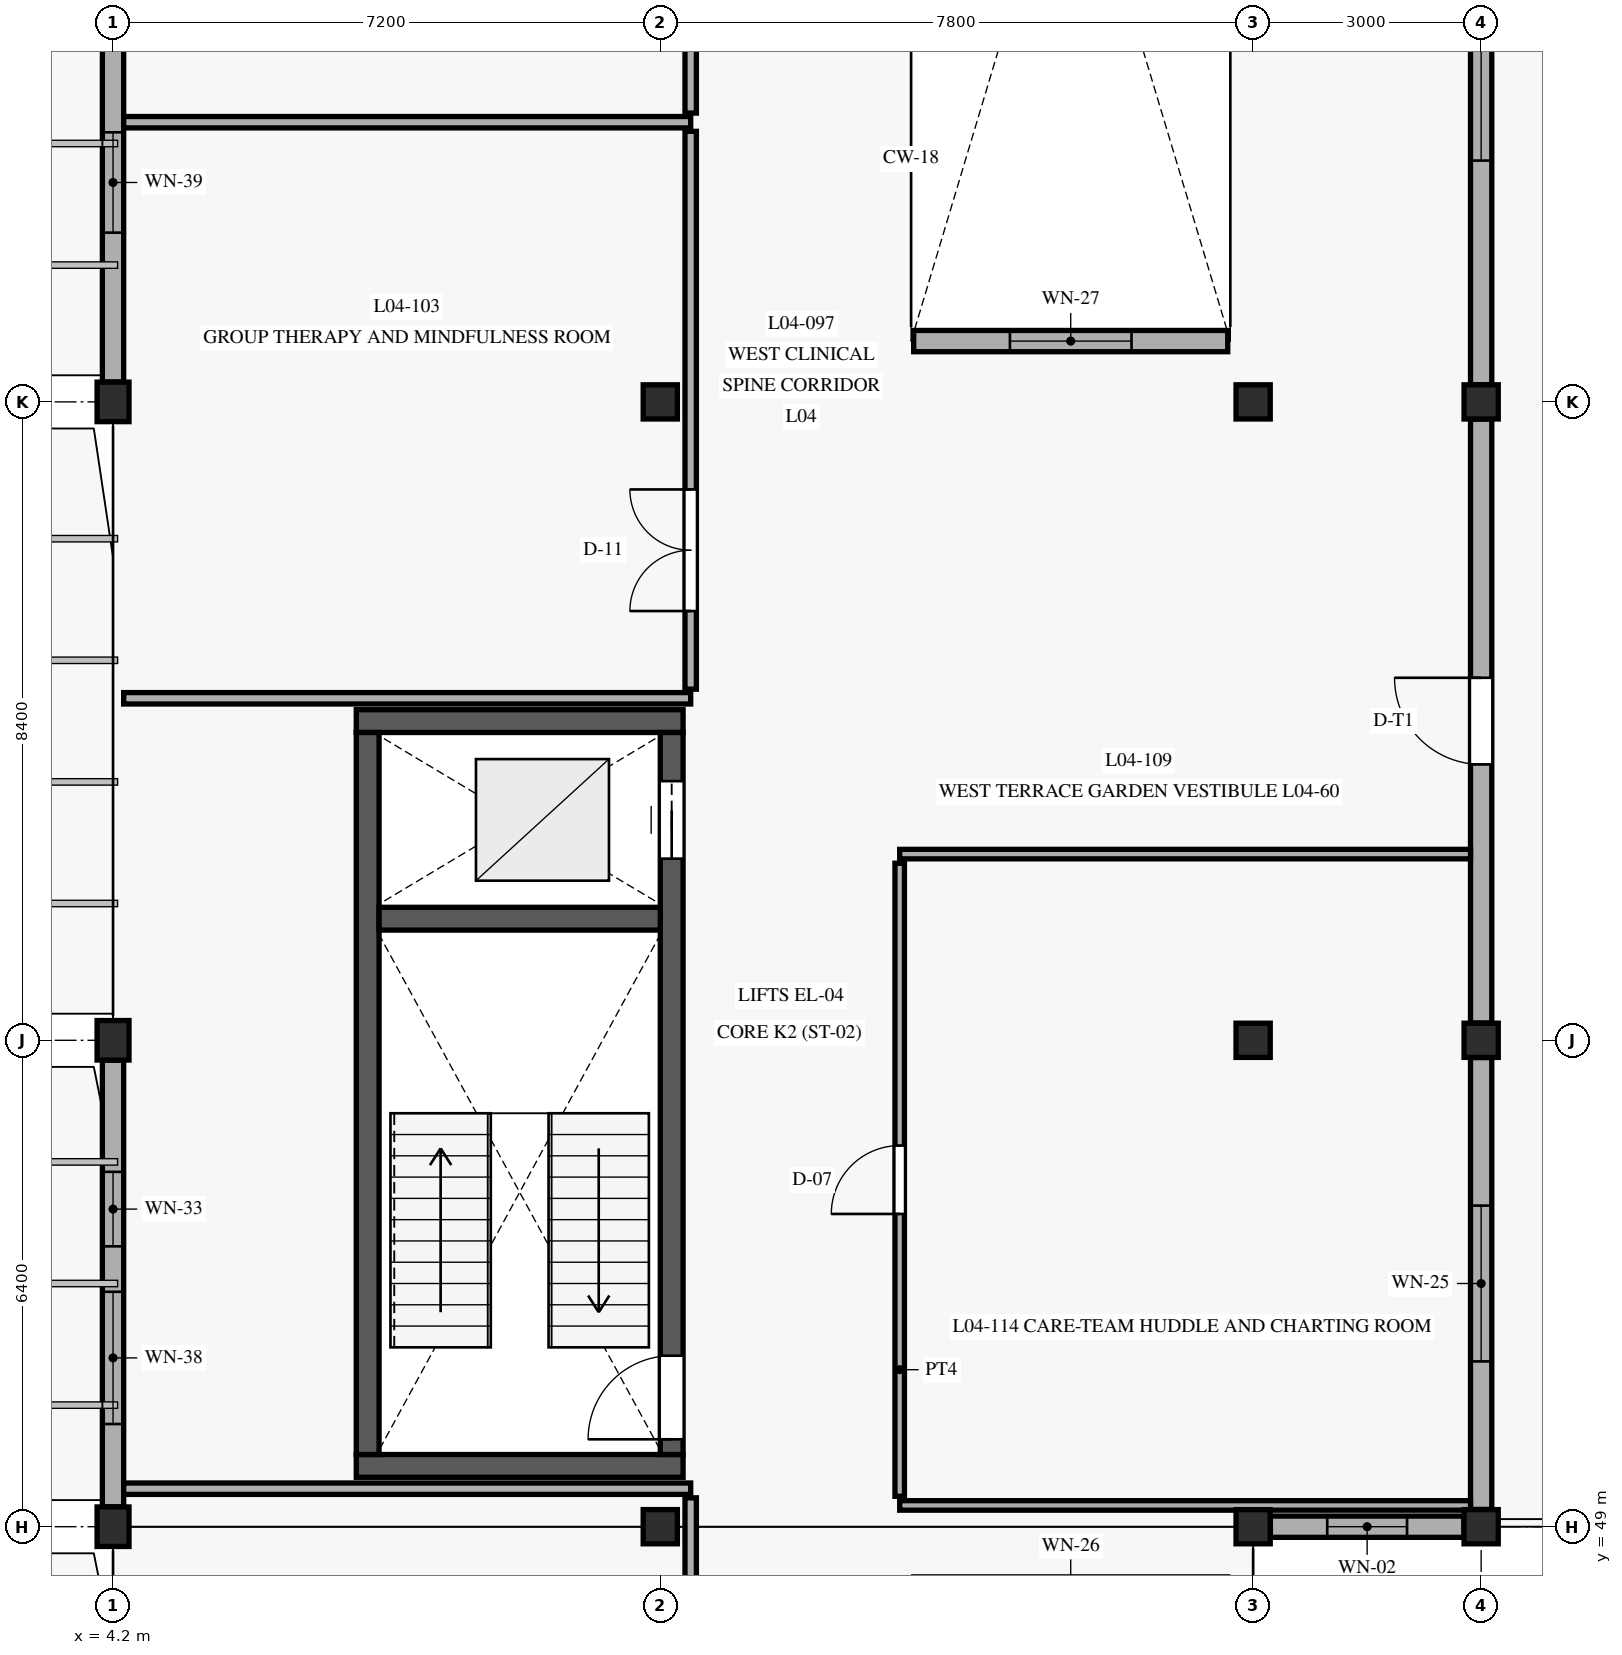
"""IFC4 building model, lengths in metres.
Left out: names, types, materials, properties, quantities, classifications, styles, units other than length and angle.
Written with IfcOpenShell. Run it as: python <this file> out.ifc"""

import sys

from ifc_helpers import new_model, si_unit, direction, frame, frame_2d, origin, origin_with_axes, origin_2d, place, context, subcontext, project, spatial, rectangle, extrude, element, fill, save


model = new_model("IFC4")
c1 = context("Model", 3, precision=1e-05, world=origin(), true_north=direction((0.0, 1.0)))
c2 = subcontext(c1, "Body", "Model", "MODEL_VIEW")
j1 = project(units=[si_unit("LENGTHUNIT", "METRE"), si_unit("PLANEANGLEUNIT", "RADIAN")], contexts=[c1])
p1 = place(None, origin())
s1 = spatial("IfcSite", under=j1, at=p1, CompositionType="ELEMENT")
p2 = place(p1, origin())
s2 = spatial("IfcBuilding", under=s1, at=p2, CompositionType="ELEMENT")
p3 = place(p2, frame((0.0, 0.0, 13.5)))
s3 = spatial("IfcBuildingStorey", under=s2, at=p3, CompositionType="ELEMENT", Elevation=13.5)
for number, where, z_axis, x_axis in (
    (1, (4.2, 49.0, 0.0), (0.0, 0.0, 1.0), (1.0, 0.0, 0.0)),
    (2, (4.2, 55.4, 0.0), (0.0, 0.0, 1.0), (1.0, 0.0, 0.0)),
    (3, (4.2, 63.8, 0.0), (0.0, 0.0, 1.0), (1.0, 0.0, 0.0)),
):
    element("IfcColumn", number, at=place(p3, frame(where, z_axis=z_axis, x_axis=x_axis)), inside=s3, PredefinedType="COLUMN", context=c2, shape_type="SweptSolid", body=[
        extrude(rectangle(XDim=0.42, YDim=0.52, at=origin_2d()), origin(), (0.0, 0.0, 1.0), 4.05),
    ])
for number, where, z_axis, x_axis in (
    (4, (11.4, 49.0, 0.0), (0.0, 0.0, 1.0), (1.0, 0.0, 0.0)),
    (5, (11.4, 63.8, 0.0), (0.0, 0.0, 1.0), (1.0, 0.0, 0.0)),
    (6, (19.2, 49.0, 0.0), (0.0, 0.0, 1.0), (1.0, 0.0, 0.0)),
    (7, (19.2, 55.4, 0.0), (0.0, 0.0, 1.0), (1.0, 0.0, 0.0)),
    (8, (19.2, 63.8, 0.0), (0.0, 0.0, 1.0), (1.0, 0.0, 0.0)),
    (9, (22.2, 49.0, 0.0), (0.0, 0.0, 1.0), (1.0, 0.0, 0.0)),
    (10, (22.2, 55.4, 0.0), (0.0, 0.0, 1.0), (1.0, 0.0, 0.0)),
    (11, (22.2, 63.8, 0.0), (0.0, 0.0, 1.0), (1.0, 0.0, 0.0)),
):
    element("IfcColumn", number, at=place(p3, frame(where, z_axis=z_axis, x_axis=x_axis)), inside=s3, PredefinedType="COLUMN", context=c2, shape_type="SweptSolid", body=[
        extrude(rectangle(XDim=0.45, YDim=0.45, at=origin_2d()), origin(), (0.0, 0.0, 1.0), 4.05),
    ])
for number, where, z_axis, x_axis in (
    (12, (7.4, 49.8, 0.0), (0.0, 0.0, 1.0), (1.0, 0.0, 0.0)),
    (13, (11.7, 59.6, 0.0), (0.0, 0.0, 1.0), (-1.0, 0.0, 0.0)),
):
    element("IfcWall", number, at=place(p3, frame(where, z_axis=z_axis, x_axis=x_axis)), inside=s3, PredefinedType="SHEAR", context=c2, shape_type="SweptSolid", body=[
        extrude(rectangle(XDim=4.3, YDim=0.3, at=frame_2d((2.15, 0.0))), origin(), (0.0, 0.0, 1.0), 3.75),
    ])
p4 = place(p3, frame((7.55, 59.45, 0.0), z_axis=(0.0, 0.0, 1.0), x_axis=(0.0, -1.0, 0.0)))
e14 = element("IfcWall", 14, at=p4, inside=s3, PredefinedType="SHEAR", context=c2, shape_type="SweptSolid", body=[
    extrude(rectangle(XDim=9.5, YDim=0.3, at=frame_2d((4.75, 0.0))), origin(), (0.0, 0.0, 1.0), 3.75),
])
p5 = place(p3, frame((11.55, 49.95, 0.0), z_axis=(0.0, 0.0, 1.0), x_axis=(0.0, 1.0, 0.0)))
e15 = element("IfcWall", 15, at=p5, inside=s3, PredefinedType="SHEAR", context=c2, shape_type="SweptSolid", body=[
    extrude(rectangle(XDim=9.5, YDim=0.3, at=frame_2d((4.75, 0.0))), origin(), (0.0, 0.0, 1.0), 3.75),
])
p6 = place(p5, frame((0.2, 0.0, 0.0)))
e16 = element("IfcOpeningElement", 16, at=p6, cuts=e15, PredefinedType="OPENING", context=c2, shape_type="SweptSolid", body=[
    extrude(rectangle(XDim=1.1, YDim=2.2, at=frame_2d((0.55, 1.1))), frame((0.0, 0.16, 0.0), z_axis=(0.0, -1.0, 0.0), x_axis=(1.0, 0.0, 0.0)), (0.0, 0.0, 1.0), 0.32),
])
p7 = place(p5, frame((7.84, 0.0, 0.0)))
e17 = element("IfcOpeningElement", 17, at=p7, cuts=e15, PredefinedType="OPENING", context=c2, shape_type="SweptSolid", body=[
    extrude(rectangle(XDim=1.02, YDim=2.15, at=frame_2d((0.51, 1.075))), frame((0.0, 0.16, 0.0), z_axis=(0.0, -1.0, 0.0), x_axis=(1.0, 0.0, 0.0)), (0.0, 0.0, 1.0), 0.32),
])
p8 = place(p3, frame((7.7, 57.0, 0.0), z_axis=(0.0, 0.0, 1.0), x_axis=(1.0, 0.0, 0.0)))
e18 = element("IfcWall", 18, at=p8, inside=s3, PredefinedType="SHEAR", context=c2, shape_type="SweptSolid", body=[
    extrude(rectangle(XDim=3.7, YDim=0.3, at=frame_2d((1.85, 0.0))), origin(), (0.0, 0.0, 1.0), 3.75),
])
p9 = place(p3, frame((4.2, 55.138, 0.0), z_axis=(0.0, 0.0, 1.0), x_axis=(0.0, -1.0, 0.0)))
e19 = element("IfcWall", 19, at=p9, inside=s3, PredefinedType="SOLIDWALL", context=c2, shape_type="SweptSolid", body=[
    extrude(rectangle(XDim=5.876, YDim=0.28, at=frame_2d((2.938, 0.0))), origin(), (0.0, 0.0, 1.0), 3.33),
])
p10 = place(p9, frame((1.469, 0.0, 0.88)))
e20 = element("IfcOpeningElement", 20, at=p10, cuts=e19, PredefinedType="OPENING", context=c2, shape_type="SweptSolid", body=[
    extrude(rectangle(XDim=0.98, YDim=2.1, at=frame_2d((0.49, 1.05))), frame((0.0, 0.15, 0.0), z_axis=(0.0, -1.0, 0.0), x_axis=(1.0, 0.0, 0.0)), (0.0, 0.0, 1.0), 0.3),
])
p11 = place(p9, frame((3.047, 0.0, 0.88)))
e21 = element("IfcOpeningElement", 21, at=p11, cuts=e19, PredefinedType="OPENING", context=c2, shape_type="SweptSolid", body=[
    extrude(rectangle(XDim=1.74, YDim=1.9, at=frame_2d((0.87, 0.95))), frame((0.0, 0.15, 0.0), z_axis=(0.0, -1.0, 0.0), x_axis=(1.0, 0.0, 0.0)), (0.0, 0.0, 1.0), 0.3),
])
p12 = place(p3, frame((4.2, 71.938, 0.0), z_axis=(0.0, 0.0, 1.0), x_axis=(0.0, -1.0, 0.0)))
e22 = element("IfcWall", 22, at=p12, inside=s3, PredefinedType="SOLIDWALL", context=c2, shape_type="SweptSolid", body=[
    extrude(rectangle(XDim=7.876, YDim=0.28, at=frame_2d((3.938, 0.0))), origin(), (0.0, 0.0, 1.0), 3.33),
])
p13 = place(p12, frame((2.065, 0.0, 0.88)))
e23 = element("IfcOpeningElement", 23, at=p13, cuts=e22, PredefinedType="OPENING", context=c2, shape_type="SweptSolid", body=[
    extrude(rectangle(XDim=1.12, YDim=1.95, at=frame_2d((0.56, 0.975))), frame((0.0, 0.15, 0.0), z_axis=(0.0, -1.0, 0.0), x_axis=(1.0, 0.0, 0.0)), (0.0, 0.0, 1.0), 0.3),
])
p14 = place(p12, frame((4.591, 0.0, 0.88)))
e24 = element("IfcOpeningElement", 24, at=p14, cuts=e22, PredefinedType="OPENING", context=c2, shape_type="SweptSolid", body=[
    extrude(rectangle(XDim=1.32, YDim=2.15, at=frame_2d((0.66, 1.075))), frame((0.0, 0.15, 0.0), z_axis=(0.0, -1.0, 0.0), x_axis=(1.0, 0.0, 0.0)), (0.0, 0.0, 1.0), 0.3),
])
p15 = place(p3, frame((22.2, 49.227, 0.0), z_axis=(0.0, 0.0, 1.0), x_axis=(0.0, 1.0, 0.0)))
e25 = element("IfcWall", 25, at=p15, inside=s3, PredefinedType="SOLIDWALL", context=c2, shape_type="SweptSolid", body=[
    extrude(rectangle(XDim=5.946, YDim=0.28, at=frame_2d((2.973, 0.0))), origin(), (0.0, 0.0, 1.0), 3.34),
])
p16 = place(p15, frame((1.948, 0.0, 0.8)))
e26 = element("IfcOpeningElement", 26, at=p16, cuts=e25, PredefinedType="OPENING", context=c2, shape_type="SweptSolid", body=[
    extrude(rectangle(XDim=2.05, YDim=1.95, at=frame_2d((1.025, 0.975))), frame((0.0, 0.15, 0.0), z_axis=(0.0, -1.0, 0.0), x_axis=(1.0, 0.0, 0.0)), (0.0, 0.0, 1.0), 0.3),
])
p17 = place(p3, frame((22.2, 55.627, 0.0), z_axis=(0.0, 0.0, 1.0), x_axis=(0.0, 1.0, 0.0)))
e27 = element("IfcWall", 27, at=p17, inside=s3, PredefinedType="SOLIDWALL", context=c2, shape_type="SweptSolid", body=[
    extrude(rectangle(XDim=7.946, YDim=0.28, at=frame_2d((3.973, 0.0))), origin(), (0.0, 0.0, 1.0), 3.34),
])
p18 = place(p17, frame((3.403, 0.0, 0.0)))
e28 = element("IfcOpeningElement", 28, at=p18, cuts=e27, PredefinedType="OPENING", context=c2, shape_type="SweptSolid", body=[
    extrude(rectangle(XDim=1.14, YDim=2.3, at=frame_2d((0.57, 1.15))), frame((0.0, 0.15, 0.0), z_axis=(0.0, -1.0, 0.0), x_axis=(1.0, 0.0, 0.0)), (0.0, 0.0, 1.0), 0.3),
])
p19 = place(p3, frame((22.2, 64.027, 0.0), z_axis=(0.0, 0.0, 1.0), x_axis=(0.0, 1.0, 0.0)))
e29 = element("IfcWall", 29, at=p19, inside=s3, PredefinedType="SOLIDWALL", context=c2, shape_type="SweptSolid", body=[
    extrude(rectangle(XDim=7.946, YDim=0.28, at=frame_2d((3.973, 0.0))), origin(), (0.0, 0.0, 1.0), 3.34),
])
p20 = place(p19, frame((2.948, 0.0, 0.8)))
e30 = element("IfcOpeningElement", 30, at=p20, cuts=e29, PredefinedType="OPENING", context=c2, shape_type="SweptSolid", body=[
    extrude(rectangle(XDim=2.05, YDim=1.95, at=frame_2d((1.025, 0.975))), frame((0.0, 0.15, 0.0), z_axis=(0.0, -1.0, 0.0), x_axis=(1.0, 0.0, 0.0)), (0.0, 0.0, 1.0), 0.3),
])
p21 = place(p3, frame((19.427, 49.0, 0.0), z_axis=(0.0, 0.0, 1.0), x_axis=(1.0, 0.0, 0.0)))
e31 = element("IfcWall", 31, at=p21, inside=s3, PredefinedType="SOLIDWALL", context=c2, shape_type="SweptSolid", body=[
    extrude(rectangle(XDim=2.546, YDim=0.28, at=frame_2d((1.273, 0.0))), origin(), (0.0, 0.0, 1.0), 3.44),
])
p22 = place(p21, frame((0.748, 0.0, 0.88)))
e32 = element("IfcOpeningElement", 32, at=p22, cuts=e31, PredefinedType="OPENING", context=c2, shape_type="SweptSolid", body=[
    extrude(rectangle(XDim=1.05, YDim=2.2, at=frame_2d((0.525, 1.1))), frame((0.0, 0.15, 0.0), z_axis=(0.0, -1.0, 0.0), x_axis=(1.0, 0.0, 0.0)), (0.0, 0.0, 1.0), 0.3),
])
p23 = place(p3, frame((18.866, 64.6, 0.0), z_axis=(0.0, 0.0, 1.0), x_axis=(-1.0, 0.0, 0.0)))
e33 = element("IfcWall", 33, at=p23, inside=s3, PredefinedType="SOLIDWALL", context=c2, shape_type="SweptSolid", body=[
    extrude(rectangle(XDim=4.132, YDim=0.28, at=frame_2d((2.066, 0.0))), origin(), (0.0, 0.0, 1.0), 3.75),
])
p24 = place(p23, frame((1.266, 0.0, 0.85)))
e34 = element("IfcOpeningElement", 34, at=p24, cuts=e33, PredefinedType="OPENING", context=c2, shape_type="SweptSolid", body=[
    extrude(rectangle(XDim=1.6, YDim=1.8, at=frame_2d((0.8, 0.9))), frame((0.0, 0.15, 0.0), z_axis=(0.0, -1.0, 0.0), x_axis=(1.0, 0.0, 0.0)), (0.0, 0.0, 1.0), 0.3),
])
p25 = place(p3, frame((11.8, 42.7, 0.0), z_axis=(0.0, 0.0, 1.0), x_axis=(0.0, 1.0, 0.0)))
e35 = element("IfcWall", 35, at=p25, inside=s3, PredefinedType="PARTITIONING", context=c2, shape_type="SweptSolid", body=[
    extrude(rectangle(XDim=6.68, YDim=0.15, at=frame_2d((3.34, 0.0))), origin(), (0.0, 0.0, 1.0), 3.345),
])
p26 = place(p25, frame((2.87, 0.0, 0.0)))
e36 = element("IfcOpeningElement", 36, at=p26, cuts=e35, PredefinedType="OPENING", context=c2, shape_type="SweptSolid", body=[
    extrude(rectangle(XDim=0.94, YDim=2.18, at=frame_2d((0.47, 1.09))), frame((0.0, 0.085, 0.0), z_axis=(0.0, -1.0, 0.0), x_axis=(1.0, 0.0, 0.0)), (0.0, 0.0, 1.0), 0.17),
])
p27 = place(p3, frame((4.34, 49.5, 0.0), z_axis=(0.0, 0.0, 1.0), x_axis=(1.0, 0.0, 0.0)))
e37 = element("IfcWall", 37, at=p27, inside=s3, PredefinedType="PARTITIONING", context=c2, shape_type="SweptSolid", body=[
    extrude(rectangle(XDim=7.46, YDim=0.15, at=frame_2d((3.73, 0.0))), origin(), (0.0, 0.0, 1.0), 3.325),
])
p28 = place(p3, frame((11.8, 60.02, 0.0), z_axis=(0.0, 0.0, 1.0), x_axis=(0.0, 1.0, 0.0)))
e38 = element("IfcWall", 38, at=p28, inside=s3, PredefinedType="PARTITIONING", context=c2, shape_type="SweptSolid", body=[
    extrude(rectangle(XDim=7.34, YDim=0.15, at=frame_2d((3.67, 0.0))), origin(), (0.0, 0.0, 1.0), 3.345),
])
p29 = place(p28, frame((1.028, 0.0, 0.0)))
e39 = element("IfcOpeningElement", 39, at=p29, cuts=e38, PredefinedType="OPENING", context=c2, shape_type="SweptSolid", body=[
    extrude(rectangle(XDim=1.6, YDim=2.25, at=frame_2d((0.8, 1.125))), frame((0.0, 0.085, 0.0), z_axis=(0.0, -1.0, 0.0), x_axis=(1.0, 0.0, 0.0)), (0.0, 0.0, 1.0), 0.17),
])
for number, where, z_axis, x_axis in (
    (40, (4.34, 67.48, 0.0), (0.0, 0.0, 1.0), (1.0, 0.0, 0.0)),
    (41, (4.34, 59.9, 0.0), (0.0, 0.0, 1.0), (1.0, 0.0, 0.0)),
):
    element("IfcWall", number, at=place(p3, frame(where, z_axis=z_axis, x_axis=x_axis)), inside=s3, PredefinedType="PARTITIONING", context=c2, shape_type="SweptSolid", body=[
        extrude(rectangle(XDim=7.46, YDim=0.15, at=frame_2d((3.73, 0.0))), origin(), (0.0, 0.0, 1.0), 3.325),
    ])
p30 = place(p3, frame((11.8, 67.6, 0.0), z_axis=(0.0, 0.0, 1.0), x_axis=(0.0, 1.0, 0.0)))
e42 = element("IfcWall", 42, at=p30, inside=s3, PredefinedType="PARTITIONING", context=c2, shape_type="SweptSolid", body=[
    extrude(rectangle(XDim=8.53, YDim=0.15, at=frame_2d((4.265, 0.0))), origin(), (0.0, 0.0, 1.0), 3.745),
])
p31 = place(p30, frame((2.817, 0.0, 0.0)))
e43 = element("IfcOpeningElement", 43, at=p31, cuts=e42, PredefinedType="OPENING", context=c2, shape_type="SweptSolid", body=[
    extrude(rectangle(XDim=0.94, YDim=2.18, at=frame_2d((0.47, 1.09))), frame((0.0, 0.085, 0.0), z_axis=(0.0, -1.0, 0.0), x_axis=(1.0, 0.0, 0.0)), (0.0, 0.0, 1.0), 0.17),
])
p32 = place(p3, frame((14.55, 49.4, 0.0), z_axis=(0.0, 0.0, 1.0), x_axis=(0.0, 1.0, 0.0)))
e44 = element("IfcWall", 44, at=p32, inside=s3, PredefinedType="PARTITIONING", context=c2, shape_type="SweptSolid", body=[
    extrude(rectangle(XDim=8.33, YDim=0.125, at=frame_2d((4.165, 0.0))), origin(), (0.0, 0.0, 1.0), 3.345),
])
p33 = place(p32, frame((3.715, 0.0, 0.0)))
e45 = element("IfcOpeningElement", 45, at=p33, cuts=e44, PredefinedType="OPENING", context=c2, shape_type="SweptSolid", body=[
    extrude(rectangle(XDim=0.9, YDim=2.12, at=frame_2d((0.45, 1.06))), frame((0.0, 0.073, 0.0), z_axis=(0.0, -1.0, 0.0), x_axis=(1.0, 0.0, 0.0)), (0.0, 0.0, 1.0), 0.145),
])
for number, where, z_axis, x_axis in (
    (46, (14.55, 49.28, 0.0), (0.0, 0.0, 1.0), (1.0, 0.0, 0.0)),
    (47, (14.55, 57.85, 0.0), (0.0, 0.0, 1.0), (1.0, 0.0, 0.0)),
):
    element("IfcWall", number, at=place(p3, frame(where, z_axis=z_axis, x_axis=x_axis)), inside=s3, PredefinedType="PARTITIONING", context=c2, shape_type="SweptSolid", body=[
        extrude(rectangle(XDim=7.51, YDim=0.125, at=frame_2d((3.755, 0.0))), origin(), (0.0, 0.0, 1.0), 3.335),
    ])
p34 = place(p6, origin_with_axes())
e48 = element("IfcDoor", 48, at=p34, inside=s3, OperationType="SINGLE_SWING_LEFT", PredefinedType="DOOR", context=c2, shape_type="SweptSolid", body=[
    extrude(rectangle(XDim=1.1, YDim=2.2, at=frame_2d((0.55, 1.1))), frame((0.0, 0.025, 0.0), z_axis=(0.0, -1.0, 0.0), x_axis=(1.0, 0.0, 0.0)), (0.0, 0.0, 1.0), 0.05),
])
fill(e16, e48)
p35 = place(p7, origin_with_axes())
e49 = element("IfcDoor", 49, at=p35, inside=s3, OperationType="SLIDING_TO_LEFT", PredefinedType="DOOR", context=c2, shape_type="SweptSolid", body=[
    extrude(rectangle(XDim=1.02, YDim=2.15, at=frame_2d((0.51, 1.075))), frame((0.0, 0.025, 0.0), z_axis=(0.0, -1.0, 0.0), x_axis=(1.0, 0.0, 0.0)), (0.0, 0.0, 1.0), 0.05),
])
fill(e17, e49)
p36 = place(p10, origin_with_axes())
e50 = element("IfcWindow", 50, at=p36, inside=s3, PartitioningType="SINGLE_PANEL", PredefinedType="WINDOW", context=c2, shape_type="SweptSolid", body=[
    extrude(rectangle(XDim=0.98, YDim=2.1, at=frame_2d((0.49, 1.05))), frame((0.0, 0.03, 0.0), z_axis=(0.0, -1.0, 0.0), x_axis=(1.0, 0.0, 0.0)), (0.0, 0.0, 1.0), 0.06),
])
fill(e20, e50)
p37 = place(p11, origin_with_axes())
e51 = element("IfcWindow", 51, at=p37, inside=s3, PartitioningType="SINGLE_PANEL", PredefinedType="WINDOW", context=c2, shape_type="SweptSolid", body=[
    extrude(rectangle(XDim=1.74, YDim=1.9, at=frame_2d((0.87, 0.95))), frame((0.0, 0.03, 0.0), z_axis=(0.0, -1.0, 0.0), x_axis=(1.0, 0.0, 0.0)), (0.0, 0.0, 1.0), 0.06),
])
fill(e21, e51)
p38 = place(p14, origin_with_axes())
e52 = element("IfcWindow", 52, at=p38, inside=s3, PartitioningType="SINGLE_PANEL", PredefinedType="WINDOW", context=c2, shape_type="SweptSolid", body=[
    extrude(rectangle(XDim=1.32, YDim=2.15, at=frame_2d((0.66, 1.075))), frame((0.0, 0.03, 0.0), z_axis=(0.0, -1.0, 0.0), x_axis=(1.0, 0.0, 0.0)), (0.0, 0.0, 1.0), 0.06),
])
fill(e24, e52)
p39 = place(p16, origin_with_axes())
e53 = element("IfcWindow", 53, at=p39, inside=s3, PartitioningType="SINGLE_PANEL", PredefinedType="WINDOW", context=c2, shape_type="SweptSolid", body=[
    extrude(rectangle(XDim=2.05, YDim=1.95, at=frame_2d((1.025, 0.975))), frame((0.0, 0.03, 0.0), z_axis=(0.0, -1.0, 0.0), x_axis=(1.0, 0.0, 0.0)), (0.0, 0.0, 1.0), 0.06),
])
fill(e26, e53)
p40 = place(p18, frame((1.14, 0.0, 0.0), z_axis=(0.0, 0.0, 1.0), x_axis=(-1.0, 0.0, 0.0)))
e54 = element("IfcDoor", 54, at=p40, inside=s3, OperationType="SINGLE_SWING_LEFT", PredefinedType="DOOR", context=c2, shape_type="SweptSolid", body=[
    extrude(rectangle(XDim=1.14, YDim=2.3, at=frame_2d((0.57, 1.15))), frame((0.0, 0.025, 0.0), z_axis=(0.0, -1.0, 0.0), x_axis=(1.0, 0.0, 0.0)), (0.0, 0.0, 1.0), 0.05),
])
fill(e28, e54)
p41 = place(p20, origin_with_axes())
e55 = element("IfcWindow", 55, at=p41, inside=s3, PartitioningType="SINGLE_PANEL", PredefinedType="WINDOW", context=c2, shape_type="SweptSolid", body=[
    extrude(rectangle(XDim=2.05, YDim=1.95, at=frame_2d((1.025, 0.975))), frame((0.0, 0.03, 0.0), z_axis=(0.0, -1.0, 0.0), x_axis=(1.0, 0.0, 0.0)), (0.0, 0.0, 1.0), 0.06),
])
fill(e30, e55)
p42 = place(p22, origin_with_axes())
e56 = element("IfcWindow", 56, at=p42, inside=s3, PartitioningType="SINGLE_PANEL", PredefinedType="WINDOW", context=c2, shape_type="SweptSolid", body=[
    extrude(rectangle(XDim=1.05, YDim=2.2, at=frame_2d((0.525, 1.1))), frame((0.0, 0.03, 0.0), z_axis=(0.0, -1.0, 0.0), x_axis=(1.0, 0.0, 0.0)), (0.0, 0.0, 1.0), 0.06),
])
fill(e32, e56)
p43 = place(p24, origin_with_axes())
e57 = element("IfcWindow", 57, at=p43, inside=s3, PartitioningType="SINGLE_PANEL", PredefinedType="WINDOW", context=c2, shape_type="SweptSolid", body=[
    extrude(rectangle(XDim=1.6, YDim=1.8, at=frame_2d((0.8, 0.9))), frame((0.0, 0.03, 0.0), z_axis=(0.0, -1.0, 0.0), x_axis=(1.0, 0.0, 0.0)), (0.0, 0.0, 1.0), 0.06),
])
fill(e34, e57)
p44 = place(p29, origin_with_axes())
e58 = element("IfcDoor", 58, at=p44, inside=s3, OperationType="DOUBLE_DOOR_SINGLE_SWING", PredefinedType="DOOR", context=c2, shape_type="SweptSolid", body=[
    extrude(rectangle(XDim=1.6, YDim=2.25, at=frame_2d((0.8, 1.125))), frame((0.0, 0.025, 0.0), z_axis=(0.0, -1.0, 0.0), x_axis=(1.0, 0.0, 0.0)), (0.0, 0.0, 1.0), 0.05),
])
fill(e39, e58)
p45 = place(p33, frame((0.9, 0.0, 0.0), z_axis=(0.0, 0.0, 1.0), x_axis=(-1.0, 0.0, 0.0)))
e59 = element("IfcDoor", 59, at=p45, inside=s3, OperationType="SINGLE_SWING_RIGHT", PredefinedType="DOOR", context=c2, shape_type="SweptSolid", body=[
    extrude(rectangle(XDim=0.9, YDim=2.12, at=frame_2d((0.45, 1.06))), frame((0.0, 0.025, 0.0), z_axis=(0.0, -1.0, 0.0), x_axis=(1.0, 0.0, 0.0)), (0.0, 0.0, 1.0), 0.05),
])
fill(e45, e59)
save(model, sys.argv[1])
